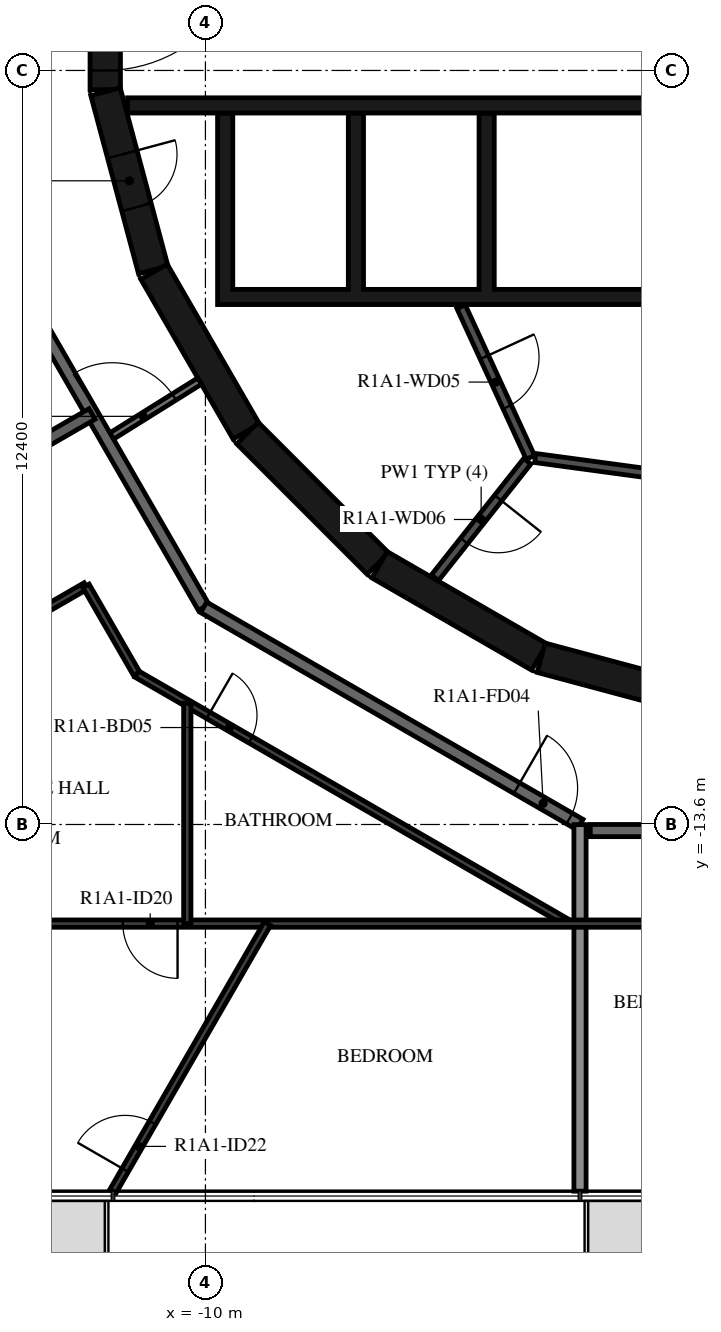
"""IFC4 building model, lengths in metres.
Left out: names, types, materials, properties, quantities, classifications, styles, units other than length and angle.
Written with IfcOpenShell. Run it as: python <this file> out.ifc"""

import sys

from ifc_helpers import new_model, si_unit, direction, frame, frame_2d, origin, place, context, subcontext, project, spatial, polyline, rectangle, outline, extrude, element, fill, save


model = new_model("IFC4")
c1 = context("Model", 3, precision=1e-05, world=origin(), true_north=direction((0.0, 1.0)))
c2 = subcontext(c1, "Body", "Model", "MODEL_VIEW")
j1 = project(units=[si_unit("LENGTHUNIT", "METRE"), si_unit("PLANEANGLEUNIT", "RADIAN")], contexts=[c1])
p1 = place(None, origin())
s1 = spatial("IfcSite", under=j1, at=p1, CompositionType="ELEMENT")
p2 = place(p1, origin())
s2 = spatial("IfcBuilding", under=s1, at=p2, CompositionType="ELEMENT")
p3 = place(p2, frame((0.0, 0.0, 41.9)))
s3 = spatial("IfcBuildingStorey", under=s2, at=p3, CompositionType="ELEMENT", Elevation=41.9)
p4 = place(p3, frame((-11.647, 1.516, 0.0), z_axis=(0.0, 0.0, 1.0), x_axis=(0.0, -1.0, 0.0)))
e1 = element("IfcWall", 1, at=p4, inside=s3, PredefinedType="SHEAR", context=c2, shape_type="SweptSolid", body=[
    extrude(rectangle(XDim=3.033, YDim=0.5, at=frame_2d((1.516, 0.0))), origin(), (0.0, 0.0, 1.0), 3.12),
])
p5 = place(p4, frame((0.316, 0.0, 0.0)))
e2 = element("IfcOpeningElement", 2, at=p5, cuts=e1, PredefinedType="OPENING", context=c2, shape_type="SweptSolid", body=[
    extrude(rectangle(XDim=2.4, YDim=2.1, at=frame_2d((1.2, 1.05))), frame((0.0, 0.26, 0.0), z_axis=(0.0, -1.0, 0.0), x_axis=(1.0, 0.0, 0.0)), (0.0, 0.0, 1.0), 0.52),
])
p6 = place(p3, frame((-11.643, -1.55, 0.0), z_axis=(0.0, 0.0, 1.0), x_axis=(0.258734743916, -0.965948410781, 0.0)))
e3 = element("IfcWall", 3, at=p6, inside=s3, PredefinedType="SHEAR", context=c2, shape_type="SweptSolid", body=[
    extrude(rectangle(XDim=3.033, YDim=0.5, at=frame_2d((1.516, 0.0))), origin(), (0.0, 0.0, 1.0), 3.12),
])
p7 = place(p6, frame((1.066, 0.0, 0.0)))
e4 = element("IfcOpeningElement", 4, at=p7, cuts=e3, PredefinedType="OPENING", context=c2, shape_type="SweptSolid", body=[
    extrude(rectangle(XDim=0.9, YDim=2.1, at=frame_2d((0.45, 1.05))), frame((0.0, 0.26, 0.0), z_axis=(0.0, -1.0, 0.0), x_axis=(1.0, 0.0, 0.0)), (0.0, 0.0, 1.0), 0.52),
])
p8 = place(p3, frame((-10.845, -4.51, 0.0), z_axis=(0.0, 0.0, 1.0), x_axis=(0.500087131594, -0.865975092491, 0.0)))
e5 = element("IfcWall", 5, at=p8, inside=s3, PredefinedType="SHEAR", context=c2, shape_type="SweptSolid", body=[
    extrude(rectangle(XDim=3.033, YDim=0.5, at=frame_2d((1.516, 0.0))), origin(), (0.0, 0.0, 1.0), 3.12),
])
p9 = place(p3, frame((-9.308, -7.164, 0.0), z_axis=(0.0, 0.0, 1.0), x_axis=(0.707106781187, -0.707106781187, 0.0)))
e6 = element("IfcWall", 6, at=p9, inside=s3, PredefinedType="SHEAR", context=c2, shape_type="SweptSolid", body=[
    extrude(rectangle(XDim=3.032, YDim=0.5, at=frame_2d((1.516, 0.0))), origin(), (0.0, 0.0, 1.0), 3.12),
])
for number, where, z_axis, x_axis in (
    (7, (-7.137, -9.329, 0.0), (0.0, 0.0, 1.0), (0.866, -0.5, 0.0)),
    (8, (-4.479, -10.858, 0.0), (0.0, 0.0, 1.0), (0.966, -0.259, 0.0)),
):
    element("IfcWall", number, at=place(p3, frame(where, z_axis=z_axis, x_axis=x_axis)), inside=s3, PredefinedType="SHEAR", context=c2, shape_type="SweptSolid", body=[
        extrude(rectangle(XDim=3.033, YDim=0.5, at=frame_2d((1.516, 0.0))), origin(), (0.0, 0.0, 1.0), 3.12),
    ])
p10 = place(p3, origin())
e9 = element("IfcWall", 9, at=p10, inside=s3, PredefinedType="SHEAR", context=c2, shape_type="SweptSolid", body=[
    extrude(outline(polyline([(9.8, -5.05), (9.8, -4.8), (9.8, -1.9), (9.55, -1.9), (9.55, -4.8), (7.65, -4.8), (7.65, -1.9), (7.4, -1.9), (7.4, -4.8), (5.5, -4.8), (5.5, -1.9), (5.25, -1.9), (5.25, -4.8), (3.35, -4.8), (3.35, -1.9), (3.1, -1.9), (3.1, -4.8), (-5.25, -4.8), (-5.25, -1.9), (-5.5, -1.9), (-5.5, -4.8), (-7.4, -4.8), (-7.4, -1.9), (-7.65, -1.9), (-7.65, -4.8), (-9.55, -4.8), (-9.55, -1.9), (-9.8, -1.9), (-9.8, -4.8), (-9.8, -5.05), (9.8, -5.05)])), origin(), (0.0, 0.0, 1.0), 3.12),
])
p11 = place(p3, frame((-11.28, -1.775, 0.0), z_axis=(0.0, 0.0, 1.0), x_axis=(1.0, 0.0, 0.0)))
e10 = element("IfcWall", 10, at=p11, inside=s3, PredefinedType="SHEAR", context=c2, shape_type="SweptSolid", body=[
    extrude(rectangle(XDim=14.38, YDim=0.25, at=frame_2d((7.19, 0.0))), origin(), (0.0, 0.0, 1.0), 3.12),
])
p12 = place(p11, frame((9.755, 0.0, 0.0)))
e11 = element("IfcOpeningElement", 11, at=p12, cuts=e10, PredefinedType="OPENING", context=c2, shape_type="SweptSolid", body=[
    extrude(rectangle(XDim=0.9, YDim=2.1, at=frame_2d((0.45, 1.05))), frame((0.0, 0.135, 0.0), z_axis=(0.0, -1.0, 0.0), x_axis=(1.0, 0.0, 0.0)), (0.0, 0.0, 1.0), 0.27),
])
p13 = place(p3, frame((-5.795, -5.086, 0.0), z_axis=(0.0, 0.0, 1.0), x_axis=(0.417887867606, -0.908498613157, 0.0)))
e12 = element("IfcWall", 12, at=p13, inside=s3, PredefinedType="PARTITIONING", context=c2, shape_type="SweptSolid", body=[
    extrude(rectangle(XDim=2.726, YDim=0.15, at=frame_2d((1.363, 0.0))), origin(), (0.0, 0.0, 1.0), 3.12),
])
p14 = place(p13, frame((0.913, 0.0, 0.0)))
e13 = element("IfcOpeningElement", 13, at=p14, cuts=e12, PredefinedType="OPENING", context=c2, shape_type="SweptSolid", body=[
    extrude(rectangle(XDim=0.9, YDim=2.1, at=frame_2d((0.45, 1.05))), frame((0.0, 0.085, 0.0), z_axis=(0.0, -1.0, 0.0), x_axis=(1.0, 0.0, 0.0)), (0.0, 0.0, 1.0), 0.17),
])
p15 = place(p3, frame((-4.706, -7.625, 0.0), z_axis=(0.0, 0.0, 1.0), x_axis=(-0.621392599334, -0.783499353856, 0.0)))
e14 = element("IfcWall", 14, at=p15, inside=s3, PredefinedType="PARTITIONING", context=c2, shape_type="SweptSolid", body=[
    extrude(rectangle(XDim=2.447, YDim=0.15, at=frame_2d((1.224, 0.0))), origin(), (0.0, 0.0, 1.0), 3.12),
])
p16 = place(p15, frame((0.774, 0.0, 0.0)))
e15 = element("IfcOpeningElement", 15, at=p16, cuts=e14, PredefinedType="OPENING", context=c2, shape_type="SweptSolid", body=[
    extrude(rectangle(XDim=0.9, YDim=2.1, at=frame_2d((0.45, 1.05))), frame((0.0, 0.085, 0.0), z_axis=(0.0, -1.0, 0.0), x_axis=(1.0, 0.0, 0.0)), (0.0, 0.0, 1.0), 0.17),
])
p17 = place(p3, frame((-2.42, -7.865, 0.0), z_axis=(0.0, 0.0, 1.0), x_axis=(-0.990972299108, 0.134066783362, 0.0)))
e16 = element("IfcWall", 16, at=p17, inside=s3, PredefinedType="PARTITIONING", context=c2, shape_type="SweptSolid", body=[
    extrude(rectangle(XDim=2.176, YDim=0.15, at=frame_2d((1.088, 0.0))), origin(), (0.0, 0.0, 1.0), 3.12),
])
p18 = place(p3, frame((-11.625, -7.264, 0.0), z_axis=(0.0, 0.0, 1.0), x_axis=(0.84803632456, 0.529938102259, 0.0)))
e17 = element("IfcWall", 17, at=p18, inside=s3, PredefinedType="PARTITIONING", context=c2, shape_type="SweptSolid", body=[
    extrude(rectangle(XDim=1.804, YDim=0.12, at=frame_2d((0.902, 0.0))), origin(), (0.0, 0.0, 1.0), 3.12),
])
p19 = place(p18, frame((0.11, 0.0, 0.0)))
e18 = element("IfcOpeningElement", 18, at=p19, cuts=e17, PredefinedType="OPENING", context=c2, shape_type="SweptSolid", body=[
    extrude(rectangle(XDim=1.2, YDim=2.1, at=frame_2d((0.6, 1.05))), frame((0.0, 0.07, 0.0), z_axis=(0.0, -1.0, 0.0), x_axis=(1.0, 0.0, 0.0)), (0.0, 0.0, 1.0), 0.14),
])
p20 = place(p3, frame((-13.7, -3.671, 0.0), z_axis=(0.0, 0.0, 1.0), x_axis=(0.500001669485, -0.866024439905, 0.0)))
e19 = element("IfcWall", 19, at=p20, inside=s3, PredefinedType="STANDARD", context=c2, shape_type="SweptSolid", body=[
    extrude(rectangle(XDim=7.342, YDim=0.2, at=frame_2d((3.671, 0.0))), origin(), (0.0, 0.0, 1.0), 3.12),
])
p21 = place(p3, frame((-10.029, -10.029, 0.0), z_axis=(0.0, 0.0, 1.0), x_axis=(0.866022878987, -0.500004373052, 0.0)))
e20 = element("IfcWall", 20, at=p21, inside=s3, PredefinedType="STANDARD", context=c2, shape_type="SweptSolid", body=[
    extrude(rectangle(XDim=7.146, YDim=0.2, at=frame_2d((3.573, 0.0))), origin(), (0.0, 0.0, 1.0), 3.12),
])
p22 = place(p21, frame((5.947, 0.0, 0.0)))
e21 = element("IfcOpeningElement", 21, at=p22, cuts=e20, PredefinedType="OPENING", context=c2, shape_type="SweptSolid", body=[
    extrude(rectangle(XDim=1.0, YDim=2.1, at=frame_2d((0.5, 1.05))), frame((0.0, 0.11, 0.0), z_axis=(0.0, -1.0, 0.0), x_axis=(1.0, 0.0, 0.0)), (0.0, 0.0, 1.0), 0.22),
])
p23 = place(p3, frame((-3.671, -13.7, 0.0), z_axis=(0.0, 0.0, 1.0), x_axis=(1.0, 0.0, 0.0)))
e22 = element("IfcWall", 22, at=p23, inside=s3, PredefinedType="STANDARD", context=c2, shape_type="SweptSolid", body=[
    extrude(rectangle(XDim=7.342, YDim=0.2, at=frame_2d((3.671, 0.0))), origin(), (0.0, 0.0, 1.0), 3.12),
])
p24 = place(p23, frame((2.1, 0.0, 0.0)))
e23 = element("IfcOpeningElement", 23, at=p24, cuts=e22, PredefinedType="OPENING", context=c2, shape_type="SweptSolid", body=[
    extrude(rectangle(XDim=1.0, YDim=2.1, at=frame_2d((0.5, 1.05))), frame((0.0, 0.11, 0.0), z_axis=(0.0, -1.0, 0.0), x_axis=(1.0, 0.0, 0.0)), (0.0, 0.0, 1.0), 0.22),
])
p25 = place(p3, frame((-18.694, -10.793, 0.0), z_axis=(0.0, 0.0, 1.0), x_axis=(0.86603400694, 0.499985098601, 0.0)))
e24 = element("IfcWall", 24, at=p25, inside=s3, PredefinedType="STANDARD", context=c2, shape_type="SweptSolid", body=[
    extrude(rectangle(XDim=7.885, YDim=0.2, at=frame_2d((3.943, 0.0))), origin(), (0.0, 0.0, 1.0), 3.12),
])
p26 = place(p3, frame((-3.84, -19.63, 0.0), z_axis=(0.0, 0.0, 1.0), x_axis=(0.0, 1.0, 0.0)))
e25 = element("IfcWall", 25, at=p26, inside=s3, PredefinedType="STANDARD", context=c2, shape_type="SweptSolid", body=[
    extrude(rectangle(XDim=6.028, YDim=0.2, at=frame_2d((3.014, 0.0))), origin(), (0.0, 0.0, 1.0), 2.73),
])
p27 = place(p3, frame((-17.099, -12.641, 0.0), z_axis=(0.0, 0.0, 1.0), x_axis=(0.866027165828, 0.499996948039, 0.0)))
e26 = element("IfcWall", 26, at=p27, inside=s3, PredefinedType="PARTITIONING", context=c2, shape_type="SweptSolid", body=[
    extrude(rectangle(XDim=5.928, YDim=0.12, at=frame_2d((2.964, 0.0))), origin(), (0.0, 0.0, 1.0), 3.12),
])
p28 = place(p27, frame((0.595, 0.0, 0.0)))
e27 = element("IfcOpeningElement", 27, at=p28, cuts=e26, PredefinedType="OPENING", context=c2, shape_type="SweptSolid", body=[
    extrude(rectangle(XDim=0.9, YDim=2.1, at=frame_2d((0.45, 1.05))), frame((0.0, 0.07, 0.0), z_axis=(0.0, -1.0, 0.0), x_axis=(1.0, 0.0, 0.0)), (0.0, 0.0, 1.0), 0.14),
])
p29 = place(p3, frame((-11.965, -9.677, 0.0), z_axis=(0.0, 0.0, 1.0), x_axis=(0.499932737185, -0.866064234506, 0.0)))
e28 = element("IfcWall", 28, at=p29, inside=s3, PredefinedType="PARTITIONING", context=c2, shape_type="SweptSolid", body=[
    extrude(rectangle(XDim=1.675, YDim=0.12, at=frame_2d((0.837, 0.0))), origin(), (0.0, 0.0, 1.0), 3.12),
])
p30 = place(p3, frame((-11.127, -11.127, 0.0), z_axis=(0.0, 0.0, 1.0), x_axis=(0.866032360344, -0.499987950692, 0.0)))
e29 = element("IfcWall", 29, at=p30, inside=s3, PredefinedType="PARTITIONING", context=c2, shape_type="SweptSolid", body=[
    extrude(rectangle(XDim=8.146, YDim=0.12, at=frame_2d((4.073, 0.0))), origin(), (0.0, 0.0, 1.0), 3.12),
])
p31 = place(p30, frame((1.357, 0.0, 0.0)))
e30 = element("IfcOpeningElement", 30, at=p31, cuts=e29, PredefinedType="OPENING", context=c2, shape_type="SweptSolid", body=[
    extrude(rectangle(XDim=0.8, YDim=2.1, at=frame_2d((0.4, 1.05))), frame((0.0, 0.07, 0.0), z_axis=(0.0, -1.0, 0.0), x_axis=(1.0, 0.0, 0.0)), (0.0, 0.0, 1.0), 0.14),
])
p32 = place(p3, frame((-1.161, -15.23, 0.0), z_axis=(0.0, 0.0, 1.0), x_axis=(-1.0, 0.0, 0.0)))
e31 = element("IfcWall", 31, at=p32, inside=s3, PredefinedType="PARTITIONING", context=c2, shape_type="SweptSolid", body=[
    extrude(rectangle(XDim=18.726, YDim=0.12, at=frame_2d((9.363, 0.0))), origin(), (0.0, 0.0, 1.0), 3.12),
])
p33 = place(p32, frame((9.297, 0.0, 0.0)))
e32 = element("IfcOpeningElement", 32, at=p33, cuts=e31, PredefinedType="OPENING", context=c2, shape_type="SweptSolid", body=[
    extrude(rectangle(XDim=0.9, YDim=2.1, at=frame_2d((0.45, 1.05))), frame((0.0, 0.07, 0.0), z_axis=(0.0, -1.0, 0.0), x_axis=(1.0, 0.0, 0.0)), (0.0, 0.0, 1.0), 0.14),
])
p34 = place(p32, frame((15.755, 0.0, 0.0)))
e33 = element("IfcOpeningElement", 33, at=p34, cuts=e31, PredefinedType="OPENING", context=c2, shape_type="SweptSolid", body=[
    extrude(rectangle(XDim=0.9, YDim=2.1, at=frame_2d((0.45, 1.05))), frame((0.0, 0.07, 0.0), z_axis=(0.0, -1.0, 0.0), x_axis=(1.0, 0.0, 0.0)), (0.0, 0.0, 1.0), 0.14),
])
p35 = place(p32, frame((0.2, 0.0, 0.0)))
e34 = element("IfcOpeningElement", 34, at=p35, cuts=e31, PredefinedType="OPENING", context=c2, shape_type="SweptSolid", body=[
    extrude(rectangle(XDim=0.9, YDim=2.1, at=frame_2d((0.45, 1.05))), frame((0.0, 0.07, 0.0), z_axis=(0.0, -1.0, 0.0), x_axis=(1.0, 0.0, 0.0)), (0.0, 0.0, 1.0), 0.14),
])
p36 = place(p3, frame((-10.298, -15.23, 0.0), z_axis=(0.0, 0.0, 1.0), x_axis=(0.0, 1.0, 0.0)))
e35 = element("IfcWall", 35, at=p36, inside=s3, PredefinedType="PARTITIONING", context=c2, shape_type="SweptSolid", body=[
    extrude(rectangle(XDim=3.624, YDim=0.12, at=frame_2d((1.812, 0.0))), origin(), (0.0, 0.0, 1.0), 3.12),
])
p37 = place(p3, frame((-11.52, -19.63, 0.0), z_axis=(0.0, 0.0, 1.0), x_axis=(0.499999763888, 0.866025540104, 0.0)))
e36 = element("IfcWall", 36, at=p37, inside=s3, PredefinedType="PARTITIONING", context=c2, shape_type="SweptSolid", body=[
    extrude(rectangle(XDim=5.081, YDim=0.12, at=frame_2d((2.54, 0.0))), origin(), (0.0, 0.0, 1.0), 3.12),
])
p38 = place(p37, frame((0.4, 0.0, 0.0)))
e37 = element("IfcOpeningElement", 37, at=p38, cuts=e36, PredefinedType="OPENING", context=c2, shape_type="SweptSolid", body=[
    extrude(rectangle(XDim=0.9, YDim=2.1, at=frame_2d((0.45, 1.05))), frame((0.0, 0.07, 0.0), z_axis=(0.0, -1.0, 0.0), x_axis=(1.0, 0.0, 0.0)), (0.0, 0.0, 1.0), 0.14),
])
p39 = place(p5, origin())
e38 = element("IfcDoor", 38, at=p39, inside=s3, OperationType="DOUBLE_DOOR_SINGLE_SWING", PredefinedType="DOOR", context=c2, shape_type="SweptSolid", body=[
    extrude(rectangle(XDim=2.4, YDim=2.1, at=frame_2d((1.2, 1.05))), frame((0.0, 0.025, 0.0), z_axis=(0.0, -1.0, 0.0), x_axis=(1.0, 0.0, 0.0)), (0.0, 0.0, 1.0), 0.05),
])
fill(e2, e38)
p40 = place(p14, origin())
e39 = element("IfcDoor", 39, at=p40, inside=s3, OperationType="SINGLE_SWING_RIGHT", PredefinedType="DOOR", context=c2, shape_type="SweptSolid", body=[
    extrude(rectangle(XDim=0.9, YDim=2.1, at=frame_2d((0.45, 1.05))), frame((0.0, 0.025, 0.0), z_axis=(0.0, -1.0, 0.0), x_axis=(1.0, 0.0, 0.0)), (0.0, 0.0, 1.0), 0.05),
])
fill(e13, e39)
p41 = place(p16, origin())
e40 = element("IfcDoor", 40, at=p41, inside=s3, OperationType="SINGLE_SWING_LEFT", PredefinedType="DOOR", context=c2, shape_type="SweptSolid", body=[
    extrude(rectangle(XDim=0.9, YDim=2.1, at=frame_2d((0.45, 1.05))), frame((0.0, 0.025, 0.0), z_axis=(0.0, -1.0, 0.0), x_axis=(1.0, 0.0, 0.0)), (0.0, 0.0, 1.0), 0.05),
])
fill(e15, e40)
p42 = place(p7, origin())
e41 = element("IfcDoor", 41, at=p42, inside=s3, OperationType="SINGLE_SWING_RIGHT", PredefinedType="DOOR", context=c2, shape_type="SweptSolid", body=[
    extrude(rectangle(XDim=0.9, YDim=2.1, at=frame_2d((0.45, 1.05))), frame((0.0, 0.025, 0.0), z_axis=(0.0, -1.0, 0.0), x_axis=(1.0, 0.0, 0.0)), (0.0, 0.0, 1.0), 0.05),
])
fill(e4, e41)
p43 = place(p22, origin())
e42 = element("IfcDoor", 42, at=p43, inside=s3, OperationType="SINGLE_SWING_LEFT", PredefinedType="DOOR", context=c2, shape_type="SweptSolid", body=[
    extrude(rectangle(XDim=1.0, YDim=2.1, at=frame_2d((0.5, 1.05))), frame((0.0, 0.025, 0.0), z_axis=(0.0, -1.0, 0.0), x_axis=(1.0, 0.0, 0.0)), (0.0, 0.0, 1.0), 0.05),
])
fill(e21, e42)
p44 = place(p31, origin())
e43 = element("IfcDoor", 43, at=p44, inside=s3, OperationType="SINGLE_SWING_LEFT", PredefinedType="DOOR", context=c2, shape_type="SweptSolid", body=[
    extrude(rectangle(XDim=0.8, YDim=2.1, at=frame_2d((0.4, 1.05))), frame((0.0, 0.025, 0.0), z_axis=(0.0, -1.0, 0.0), x_axis=(1.0, 0.0, 0.0)), (0.0, 0.0, 1.0), 0.05),
])
fill(e30, e43)
p45 = place(p33, origin())
e44 = element("IfcDoor", 44, at=p45, inside=s3, OperationType="SINGLE_SWING_LEFT", PredefinedType="DOOR", context=c2, shape_type="SweptSolid", body=[
    extrude(rectangle(XDim=0.9, YDim=2.1, at=frame_2d((0.45, 1.05))), frame((0.0, 0.025, 0.0), z_axis=(0.0, -1.0, 0.0), x_axis=(1.0, 0.0, 0.0)), (0.0, 0.0, 1.0), 0.05),
])
fill(e32, e44)
p46 = place(p38, origin())
e45 = element("IfcDoor", 45, at=p46, inside=s3, OperationType="SINGLE_SWING_RIGHT", PredefinedType="DOOR", context=c2, shape_type="SweptSolid", body=[
    extrude(rectangle(XDim=0.9, YDim=2.1, at=frame_2d((0.45, 1.05))), frame((0.0, 0.025, 0.0), z_axis=(0.0, -1.0, 0.0), x_axis=(1.0, 0.0, 0.0)), (0.0, 0.0, 1.0), 0.05),
])
fill(e37, e45)
p47 = place(p19, origin())
e46 = element("IfcDoor", 46, at=p47, inside=s3, OperationType="DOUBLE_DOOR_SINGLE_SWING", PredefinedType="DOOR", context=c2, shape_type="SweptSolid", body=[
    extrude(rectangle(XDim=1.2, YDim=2.1, at=frame_2d((0.6, 1.05))), frame((0.0, 0.025, 0.0), z_axis=(0.0, -1.0, 0.0), x_axis=(1.0, 0.0, 0.0)), (0.0, 0.0, 1.0), 0.05),
])
fill(e18, e46)
save(model, sys.argv[1])
